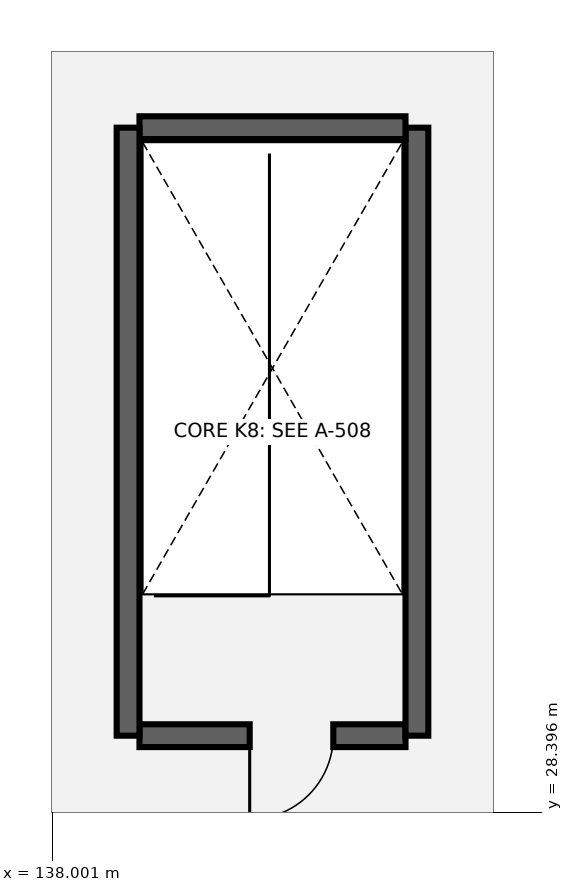
"""IFC4 building model, lengths in metres.
Left out: names, types, materials, properties, quantities, classifications, styles, units other than length and angle.
Written with IfcOpenShell. Run it as: python <this file> out.ifc"""

import sys

from ifc_helpers import new_model, si_unit, direction, frame, frame_2d, origin, place, context, subcontext, project, spatial, rectangle, extrude, element, fill, save


model = new_model("IFC4")
c1 = context("Model", 3, precision=1e-05, world=origin(), true_north=direction((0.0, 1.0)))
c2 = subcontext(c1, "Body", "Model", "MODEL_VIEW")
j1 = project(units=[si_unit("LENGTHUNIT", "METRE"), si_unit("PLANEANGLEUNIT", "RADIAN")], contexts=[c1])
p1 = place(None, origin())
s1 = spatial("IfcSite", under=j1, at=p1, CompositionType="ELEMENT")
p2 = place(p1, origin())
s2 = spatial("IfcBuilding", under=s1, at=p2, CompositionType="ELEMENT")
p3 = place(p2, frame((0.0, 0.0, 5.4)))
s3 = spatial("IfcBuildingStorey", under=s2, at=p3, CompositionType="ELEMENT", Elevation=5.4)
p4 = place(p3, frame((142.65, 29.4, 0.0), z_axis=(0.0, 0.0, 1.0), x_axis=(-1.0, 0.0, 0.0)))
e1 = element("IfcWall", 1, at=p4, inside=s3, PredefinedType="SHEAR", context=c2, shape_type="SweptSolid", body=[
    extrude(rectangle(XDim=3.5, YDim=0.3, at=frame_2d((1.75, 0.0))), origin(), (0.0, 0.0, 1.0), 4.5),
])
p5 = place(p4, frame((0.95, 0.0, 0.0)))
e2 = element("IfcOpeningElement", 2, at=p5, cuts=e1, PredefinedType="OPENING", context=c2, shape_type="SweptSolid", body=[
    extrude(rectangle(XDim=1.1, YDim=2.15, at=frame_2d((0.55, 1.075))), frame((0.0, 0.16, 0.0), z_axis=(0.0, -1.0, 0.0), x_axis=(1.0, 0.0, 0.0)), (0.0, 0.0, 1.0), 0.32),
])
p6 = place(p3, frame((142.8, 29.4, 0.0), z_axis=(0.0, 0.0, 1.0), x_axis=(0.0, 1.0, 0.0)))
e3 = element("IfcWall", 3, at=p6, inside=s3, PredefinedType="SHEAR", context=c2, shape_type="SweptSolid", body=[
    extrude(rectangle(XDim=8.0, YDim=0.3, at=frame_2d((4.0, 0.0))), origin(), (0.0, 0.0, 1.0), 4.5),
])
p7 = place(p3, frame((142.65, 37.4, 0.0), z_axis=(0.0, 0.0, 1.0), x_axis=(-1.0, 0.0, 0.0)))
e4 = element("IfcWall", 4, at=p7, inside=s3, PredefinedType="SHEAR", context=c2, shape_type="SweptSolid", body=[
    extrude(rectangle(XDim=3.5, YDim=0.3, at=frame_2d((1.75, 0.0))), origin(), (0.0, 0.0, 1.0), 4.5),
])
p8 = place(p3, frame((139.0, 37.4, 0.0), z_axis=(0.0, 0.0, 1.0), x_axis=(0.0, -1.0, 0.0)))
e5 = element("IfcWall", 5, at=p8, inside=s3, PredefinedType="SHEAR", context=c2, shape_type="SweptSolid", body=[
    extrude(rectangle(XDim=8.0, YDim=0.3, at=frame_2d((4.0, 0.0))), origin(), (0.0, 0.0, 1.0), 4.5),
])
p9 = place(p5, origin())
e6 = element("IfcDoor", 6, at=p9, inside=s3, OperationType="SINGLE_SWING_RIGHT", PredefinedType="DOOR", context=c2, shape_type="SweptSolid", body=[
    extrude(rectangle(XDim=1.1, YDim=2.15, at=frame_2d((0.55, 1.075))), frame((0.0, 0.025, 0.0), z_axis=(0.0, -1.0, 0.0), x_axis=(1.0, 0.0, 0.0)), (0.0, 0.0, 1.0), 0.05),
])
fill(e2, e6)
save(model, sys.argv[1])
